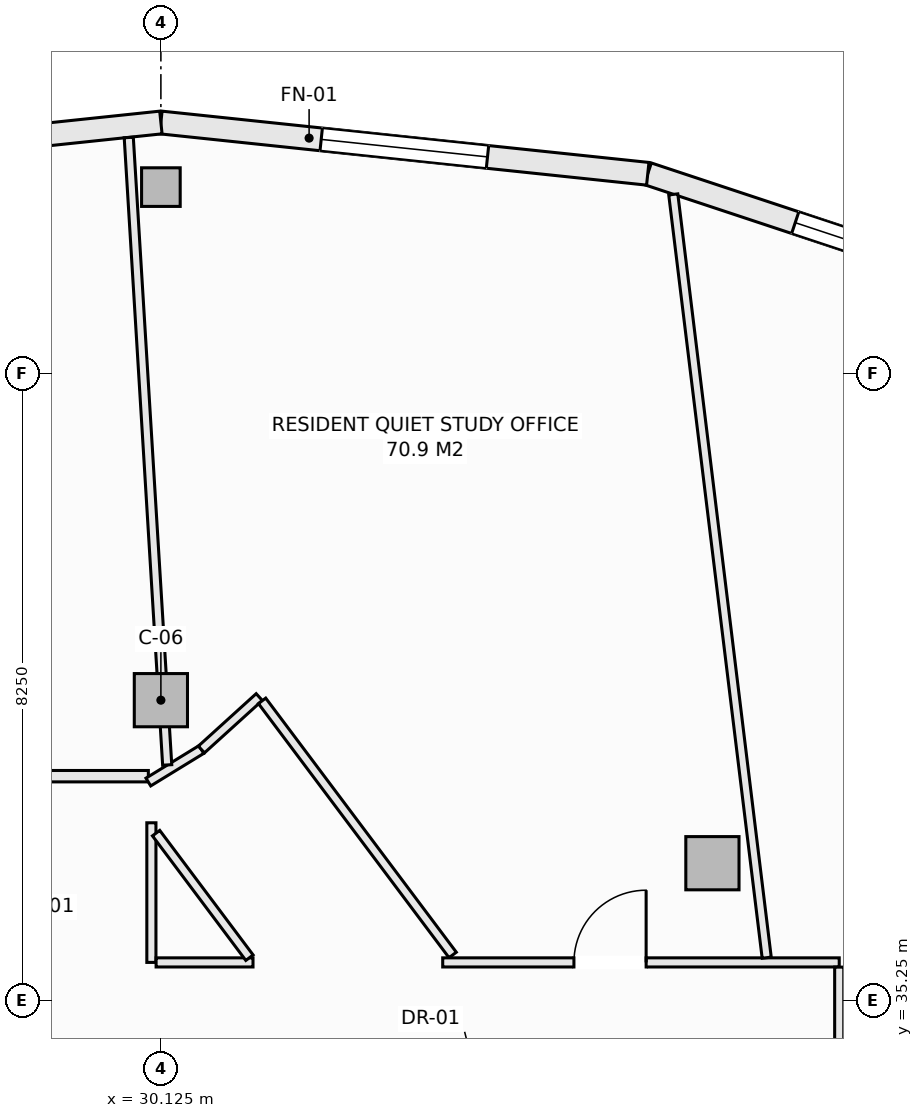
"""IFC4 building model, lengths in metres.
Left out: names, types, materials, properties, quantities, classifications, styles, units other than length and angle.
Written with IfcOpenShell. Run it as: python <this file> out.ifc"""

import sys

from ifc_helpers import new_model, si_unit, direction, frame, frame_2d, origin, origin_2d, place, context, subcontext, project, spatial, rectangle, hollow_rectangle, extrude, element, fill, save


model = new_model("IFC4")
c1 = context("Model", 3, precision=1e-05, world=origin(), true_north=direction((0.0, 1.0)))
c2 = subcontext(c1, "Body", "Model", "MODEL_VIEW")
j1 = project(units=[si_unit("LENGTHUNIT", "METRE"), si_unit("PLANEANGLEUNIT", "RADIAN")], contexts=[c1])
p1 = place(None, origin())
s1 = spatial("IfcSite", under=j1, at=p1, CompositionType="ELEMENT")
p2 = place(p1, origin())
s2 = spatial("IfcBuilding", under=s1, at=p2, CompositionType="ELEMENT")
p3 = place(p2, frame((0.0, 0.0, 209.6)))
s3 = spatial("IfcBuildingStorey", under=s2, at=p3, CompositionType="ELEMENT", Elevation=209.6)
p4 = place(p3, frame((30.125, 45.95, -0.27), z_axis=(0.0, 0.0, 1.0), x_axis=(1.0, 0.0, 0.0)))
e1 = element("IfcColumn", 1, at=p4, inside=s3, PredefinedType="COLUMN", context=c2, shape_type="SweptSolid", body=[
    extrude(hollow_rectangle(XDim=0.508, YDim=0.508, WallThickness=0.019, at=origin_2d()), origin(), (0.0, 0.0, 1.0), 3.3),
])
for number, where, z_axis, x_axis in (
    (2, (37.382, 37.055, -0.27), (0.0, 0.0, 1.0), (1.0, 0.0, 0.0)),
    (3, (30.125, 39.2, -0.27), (0.0, 0.0, 1.0), (1.0, 0.0, 0.0)),
):
    element("IfcColumn", number, at=place(p3, frame(where, z_axis=z_axis, x_axis=x_axis)), inside=s3, PredefinedType="COLUMN", context=c2, shape_type="SweptSolid", body=[
        extrude(rectangle(XDim=0.7, YDim=0.7, at=origin_2d()), origin(), (0.0, 0.0, 1.0), 3.3),
    ])
p5 = place(p3, frame((36.531, 46.125, 0.0), z_axis=(0.0, 0.0, 1.0), x_axis=(0.949240877604, -0.314550085495, 0.0)))
e4 = element("IfcWall", 4, at=p5, inside=s3, PredefinedType="SOLIDWALL", context=c2, shape_type="SweptSolid", body=[
    extrude(rectangle(XDim=6.288, YDim=0.3, at=frame_2d((3.144, 0.0))), origin(), (0.0, 0.0, 1.0), 2.605),
])
p6 = place(p5, frame((2.044, 0.0, 0.72)))
e5 = element("IfcOpeningElement", 5, at=p6, cuts=e4, PredefinedType="OPENING", context=c2, shape_type="SweptSolid", body=[
    extrude(rectangle(XDim=2.2, YDim=1.65, at=frame_2d((1.1, 0.825))), frame((0.0, 0.16, 0.0), z_axis=(0.0, -1.0, 0.0), x_axis=(1.0, 0.0, 0.0)), (0.0, 0.0, 1.0), 0.32),
])
p7 = place(p3, frame((30.125, 46.8, 0.0), z_axis=(0.0, 0.0, 1.0), x_axis=(0.994497142298, -0.104763705363, 0.0)))
e6 = element("IfcWall", 6, at=p7, inside=s3, PredefinedType="SOLIDWALL", context=c2, shape_type="SweptSolid", body=[
    extrude(rectangle(XDim=6.441, YDim=0.3, at=frame_2d((3.221, 0.0))), origin(), (0.0, 0.0, 1.0), 2.605),
])
p8 = place(p7, frame((2.121, 0.0, 0.72)))
e7 = element("IfcOpeningElement", 7, at=p8, cuts=e6, PredefinedType="OPENING", context=c2, shape_type="SweptSolid", body=[
    extrude(rectangle(XDim=2.2, YDim=1.65, at=frame_2d((1.1, 0.825))), frame((0.0, 0.16, 0.0), z_axis=(0.0, -1.0, 0.0), x_axis=(1.0, 0.0, 0.0)), (0.0, 0.0, 1.0), 0.32),
])
p9 = place(p3, frame((23.719, 46.125, 0.0), z_axis=(0.0, 0.0, 1.0), x_axis=(0.994497142298, 0.104763705363, 0.0)))
e8 = element("IfcWall", 8, at=p9, inside=s3, PredefinedType="SOLIDWALL", context=c2, shape_type="SweptSolid", body=[
    extrude(rectangle(XDim=6.441, YDim=0.3, at=frame_2d((3.221, 0.0))), origin(), (0.0, 0.0, 1.0), 2.605),
])
p10 = place(p9, frame((2.121, 0.0, 0.72)))
e9 = element("IfcOpeningElement", 9, at=p10, cuts=e8, PredefinedType="OPENING", context=c2, shape_type="SweptSolid", body=[
    extrude(rectangle(XDim=2.2, YDim=1.65, at=frame_2d((1.1, 0.825))), frame((0.0, 0.16, 0.0), z_axis=(0.0, -1.0, 0.0), x_axis=(1.0, 0.0, 0.0)), (0.0, 0.0, 1.0), 0.32),
])
p11 = place(p3, frame((30.0, 35.75, 0.0), z_axis=(0.0, 0.0, 1.0), x_axis=(0.0, 1.0, 0.0)))
e10 = element("IfcWall", 10, at=p11, inside=s3, PredefinedType="PARTITIONING", context=c2, shape_type="SweptSolid", body=[
    extrude(rectangle(XDim=1.837, YDim=0.12, at=frame_2d((0.918, 0.0))), origin(), (0.0, 0.0, 1.0), 3.03),
])
p12 = place(p3, frame((27.227, 38.2, 0.0), z_axis=(0.0, 0.0, 1.0), x_axis=(1.0, 0.0, 0.0)))
e11 = element("IfcWall", 11, at=p12, inside=s3, PredefinedType="PARTITIONING", context=c2, shape_type="SweptSolid", body=[
    extrude(rectangle(XDim=2.733, YDim=0.15, at=frame_2d((1.366, 0.0))), origin(), (0.0, 0.0, 1.0), 3.03),
])
p13 = place(p3, frame((29.96, 38.123, 0.0), z_axis=(0.0, 0.0, 1.0), x_axis=(0.852506956574, 0.522715877885, 0.0)))
e12 = element("IfcWall", 12, at=p13, inside=s3, PredefinedType="PARTITIONING", context=c2, shape_type="SweptSolid", body=[
    extrude(rectangle(XDim=0.819, YDim=0.12, at=frame_2d((0.409, 0.0))), origin(), (0.0, 0.0, 1.0), 3.03),
])
p14 = place(p3, frame((30.658, 38.551, 0.0), z_axis=(0.0, 0.0, 1.0), x_axis=(0.74084279818, 0.671678456097, 0.0)))
e13 = element("IfcWall", 13, at=p14, inside=s3, PredefinedType="PARTITIONING", context=c2, shape_type="SweptSolid", body=[
    extrude(rectangle(XDim=1.027, YDim=0.12, at=frame_2d((0.514, 0.0))), origin(), (0.0, 0.0, 1.0), 3.03),
])
p15 = place(p3, frame((31.456, 39.191, 0.0), z_axis=(0.0, 0.0, 1.0), x_axis=(0.600056078533, -0.799957938029, 0.0)))
e14 = element("IfcWall", 14, at=p15, inside=s3, PredefinedType="PARTITIONING", context=c2, shape_type="SweptSolid", body=[
    extrude(rectangle(XDim=4.179, YDim=0.12, at=frame_2d((2.09, 0.0))), origin(), (0.0, 0.0, 1.0), 2.478),
])
p16 = place(p3, frame((30.062, 35.75, 0.0), z_axis=(0.0, 0.0, 1.0), x_axis=(1.0, 0.0, 0.0)))
e15 = element("IfcWall", 15, at=p16, inside=s3, PredefinedType="PARTITIONING", context=c2, shape_type="SweptSolid", body=[
    extrude(rectangle(XDim=1.275, YDim=0.12, at=frame_2d((0.637, 0.0))), origin(), (0.0, 0.0, 1.0), 3.03),
])
p17 = place(p3, frame((33.833, 35.75, 0.0), z_axis=(0.0, 0.0, 1.0), x_axis=(1.0, 0.0, 0.0)))
e16 = element("IfcWall", 16, at=p17, inside=s3, PredefinedType="PARTITIONING", context=c2, shape_type="SweptSolid", body=[
    extrude(rectangle(XDim=5.217, YDim=0.12, at=frame_2d((2.608, 0.0))), origin(), (0.0, 0.0, 1.0), 2.478),
])
p18 = place(p17, frame((1.726, 0.0, 0.0)))
e17 = element("IfcOpeningElement", 17, at=p18, cuts=e16, PredefinedType="OPENING", context=c2, shape_type="SweptSolid", body=[
    extrude(rectangle(XDim=0.95, YDim=2.1, at=frame_2d((0.475, 1.05))), frame((0.0, 0.07, 0.0), z_axis=(0.0, -1.0, 0.0), x_axis=(1.0, 0.0, 0.0)), (0.0, 0.0, 1.0), 0.14),
])
p19 = place(p3, frame((39.05, 33.75, 0.0), z_axis=(0.0, 0.0, 1.0), x_axis=(0.0, 1.0, 0.0)))
e18 = element("IfcWall", 18, at=p19, inside=s3, PredefinedType="PARTITIONING", context=c2, shape_type="SweptSolid", body=[
    extrude(rectangle(XDim=1.938, YDim=0.12, at=frame_2d((0.969, 0.0))), origin(), (0.0, 0.0, 1.0), 3.03),
])
p20 = place(p3, frame((30.062, 37.451, 0.0), z_axis=(0.0, 0.0, 1.0), x_axis=(0.599790195836, -0.800157310145, 0.0)))
e19 = element("IfcWall", 19, at=p20, inside=s3, PredefinedType="PARTITIONING", context=c2, shape_type="SweptSolid", body=[
    extrude(rectangle(XDim=2.048, YDim=0.12, at=frame_2d((1.024, 0.0))), origin(), (0.0, 0.0, 1.0), 3.03),
])
p21 = place(p3, frame((29.702, 46.603, 0.0), z_axis=(0.0, 0.0, 1.0), x_axis=(0.06113767321, -0.998129342778, 0.0)))
e20 = element("IfcWall", 20, at=p21, inside=s3, PredefinedType="PARTITIONING", context=c2, shape_type="SweptSolid", body=[
    extrude(rectangle(XDim=8.27, YDim=0.12, at=frame_2d((4.135, 0.0))), origin(), (0.0, 0.0, 1.0), 2.712),
])
p22 = place(p3, frame((36.866, 45.854, 0.0), z_axis=(0.0, 0.0, 1.0), x_axis=(0.12152760456, -0.99258805218, 0.0)))
e21 = element("IfcWall", 21, at=p22, inside=s3, PredefinedType="PARTITIONING", context=c2, shape_type="SweptSolid", body=[
    extrude(rectangle(XDim=10.117, YDim=0.12, at=frame_2d((5.059, 0.0))), origin(), (0.0, 0.0, 1.0), 2.478),
])
p23 = place(p6, origin())
e22 = element("IfcWindow", 22, at=p23, inside=s3, PartitioningType="SINGLE_PANEL", PredefinedType="WINDOW", context=c2, shape_type="SweptSolid", body=[
    extrude(rectangle(XDim=2.2, YDim=1.65, at=frame_2d((1.1, 0.825))), frame((0.0, 0.03, 0.0), z_axis=(0.0, -1.0, 0.0), x_axis=(1.0, 0.0, 0.0)), (0.0, 0.0, 1.0), 0.06),
])
fill(e5, e22)
p24 = place(p8, origin())
e23 = element("IfcWindow", 23, at=p24, inside=s3, PartitioningType="SINGLE_PANEL", PredefinedType="WINDOW", context=c2, shape_type="SweptSolid", body=[
    extrude(rectangle(XDim=2.2, YDim=1.65, at=frame_2d((1.1, 0.825))), frame((0.0, 0.03, 0.0), z_axis=(0.0, -1.0, 0.0), x_axis=(1.0, 0.0, 0.0)), (0.0, 0.0, 1.0), 0.06),
])
fill(e7, e23)
p25 = place(p18, origin())
e24 = element("IfcDoor", 24, at=p25, inside=s3, OperationType="SINGLE_SWING_RIGHT", PredefinedType="DOOR", context=c2, shape_type="SweptSolid", body=[
    extrude(rectangle(XDim=0.95, YDim=2.1, at=frame_2d((0.475, 1.05))), frame((0.0, 0.025, 0.0), z_axis=(0.0, -1.0, 0.0), x_axis=(1.0, 0.0, 0.0)), (0.0, 0.0, 1.0), 0.05),
])
fill(e17, e24)
save(model, sys.argv[1])
